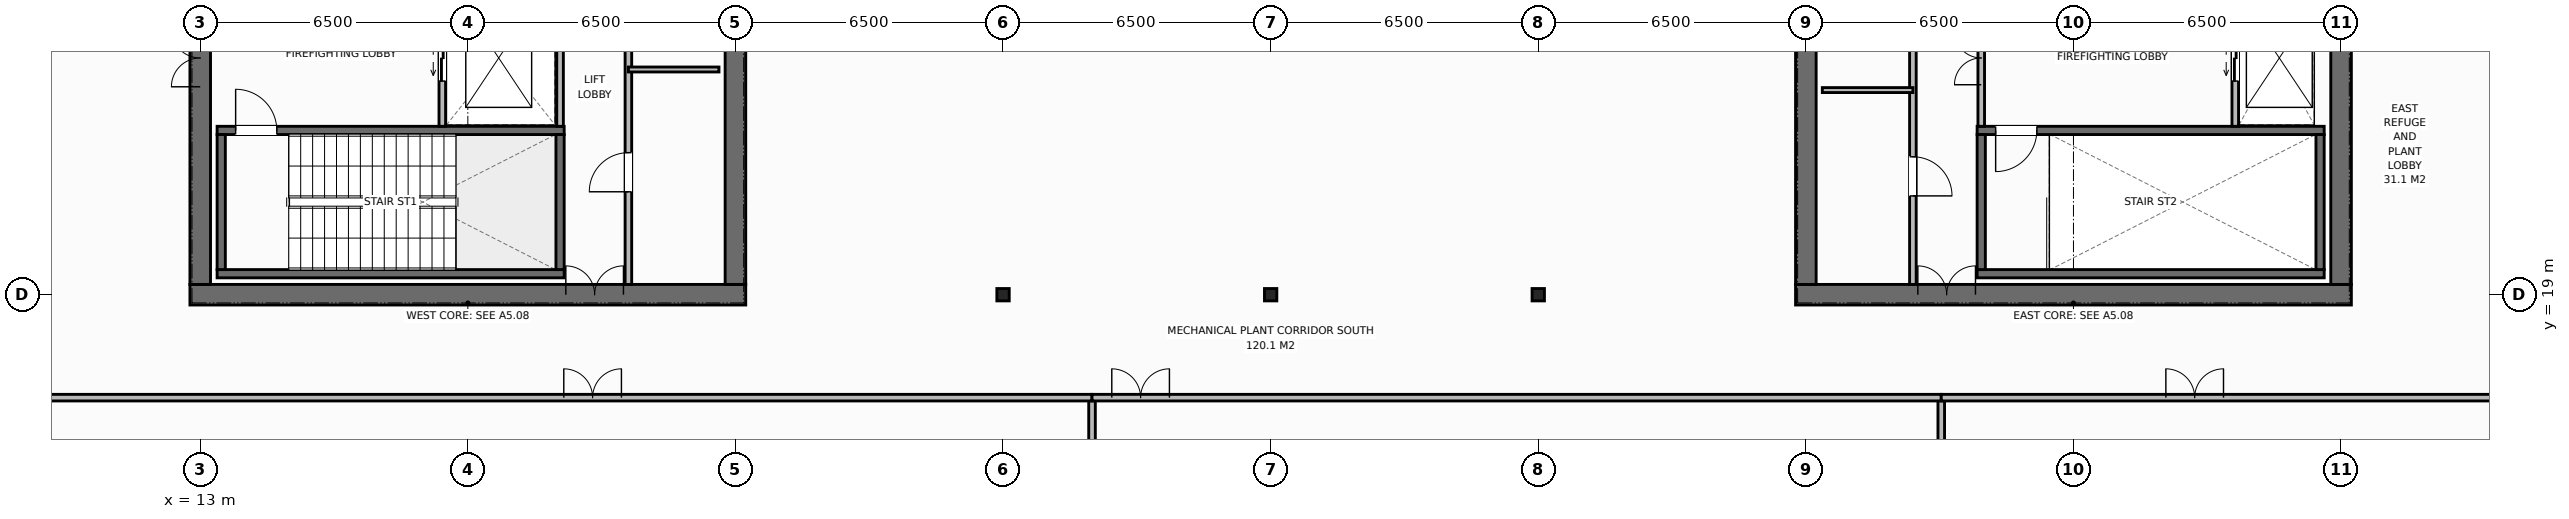
"""IFC4 building model, lengths in metres.
Left out: names, types, materials, properties, quantities, classifications, styles, units other than length and angle.
Written with IfcOpenShell. Run it as: python <this file> out.ifc"""

import sys

from ifc_helpers import new_model, si_unit, direction, frame, frame_2d, origin, origin_2d, place, context, subcontext, project, spatial, rectangle, i_section, extrude, element, fill, save


model = new_model("IFC4")
c1 = context("Model", 3, precision=1e-05, world=origin(), true_north=direction((0.0, 1.0)))
c2 = subcontext(c1, "Body", "Model", "MODEL_VIEW")
j1 = project(units=[si_unit("LENGTHUNIT", "METRE"), si_unit("PLANEANGLEUNIT", "RADIAN")], contexts=[c1])
p1 = place(None, origin())
s1 = spatial("IfcSite", under=j1, at=p1, CompositionType="ELEMENT")
p2 = place(p1, origin())
s2 = spatial("IfcBuilding", under=s1, at=p2, CompositionType="ELEMENT")
p3 = place(p2, frame((0.0, 0.0, 315.4)))
s3 = spatial("IfcBuildingStorey", under=s2, at=p3, CompositionType="ELEMENT", Elevation=315.4)
p4 = place(p3, frame((12.75, 19.0, 0.0), z_axis=(0.0, 0.0, 1.0), x_axis=(1.0, 0.0, 0.0)))
e1 = element("IfcWall", 1, at=p4, inside=s3, PredefinedType="SHEAR", context=c2, shape_type="SweptSolid", body=[
    extrude(rectangle(XDim=13.5, YDim=0.5, at=frame_2d((6.75, 0.0))), origin(), (0.0, 0.0, 1.0), 4.58),
])
p5 = place(p4, frame((9.13, 0.0, 0.0)))
e2 = element("IfcOpeningElement", 2, at=p5, cuts=e1, PredefinedType="OPENING", context=c2, shape_type="SweptSolid", body=[
    extrude(rectangle(XDim=1.4, YDim=2.2, at=frame_2d((0.7, 1.1))), frame((0.0, 0.26, 0.0), z_axis=(0.0, -1.0, 0.0), x_axis=(1.0, 0.0, 0.0)), (0.0, 0.0, 1.0), 0.52),
])
p6 = place(p3, frame((13.0, 19.25, 0.0), z_axis=(0.0, 0.0, 1.0), x_axis=(0.0, 1.0, 0.0)))
e3 = element("IfcWall", 3, at=p6, inside=s3, PredefinedType="SHEAR", context=c2, shape_type="SweptSolid", body=[
    extrude(rectangle(XDim=13.5, YDim=0.5, at=frame_2d((6.75, 0.0))), origin(), (0.0, 0.0, 1.0), 4.58),
])
p7 = place(p6, frame((4.8, 0.0, 0.0)))
e4 = element("IfcOpeningElement", 4, at=p7, cuts=e3, PredefinedType="OPENING", context=c2, shape_type="SweptSolid", body=[
    extrude(rectangle(XDim=1.4, YDim=2.2, at=frame_2d((0.7, 1.1))), frame((0.0, 0.26, 0.0), z_axis=(0.0, -1.0, 0.0), x_axis=(1.0, 0.0, 0.0)), (0.0, 0.0, 1.0), 0.52),
])
p8 = place(p3, frame((26.0, 19.25, 0.0), z_axis=(0.0, 0.0, 1.0), x_axis=(0.0, 1.0, 0.0)))
e5 = element("IfcWall", 5, at=p8, inside=s3, PredefinedType="SHEAR", context=c2, shape_type="SweptSolid", body=[
    extrude(rectangle(XDim=13.5, YDim=0.5, at=frame_2d((6.75, 0.0))), origin(), (0.0, 0.0, 1.0), 4.58),
])
p9 = place(p3, frame((51.75, 19.0, 0.0), z_axis=(0.0, 0.0, 1.0), x_axis=(1.0, 0.0, 0.0)))
e6 = element("IfcWall", 6, at=p9, inside=s3, PredefinedType="SHEAR", context=c2, shape_type="SweptSolid", body=[
    extrude(rectangle(XDim=13.5, YDim=0.5, at=frame_2d((6.75, 0.0))), origin(), (0.0, 0.0, 1.0), 4.58),
])
p10 = place(p9, frame((2.97, 0.0, 0.0)))
e7 = element("IfcOpeningElement", 7, at=p10, cuts=e6, PredefinedType="OPENING", context=c2, shape_type="SweptSolid", body=[
    extrude(rectangle(XDim=1.4, YDim=2.2, at=frame_2d((0.7, 1.1))), frame((0.0, 0.26, 0.0), z_axis=(0.0, -1.0, 0.0), x_axis=(1.0, 0.0, 0.0)), (0.0, 0.0, 1.0), 0.52),
])
p11 = place(p3, frame((52.0, 19.25, 0.0), z_axis=(0.0, 0.0, 1.0), x_axis=(0.0, 1.0, 0.0)))
e8 = element("IfcWall", 8, at=p11, inside=s3, PredefinedType="SHEAR", context=c2, shape_type="SweptSolid", body=[
    extrude(rectangle(XDim=13.5, YDim=0.5, at=frame_2d((6.75, 0.0))), origin(), (0.0, 0.0, 1.0), 4.58),
])
p12 = place(p3, frame((65.0, 19.25, 0.0), z_axis=(0.0, 0.0, 1.0), x_axis=(0.0, 1.0, 0.0)))
e9 = element("IfcWall", 9, at=p12, inside=s3, PredefinedType="SHEAR", context=c2, shape_type="SweptSolid", body=[
    extrude(rectangle(XDim=13.5, YDim=0.5, at=frame_2d((6.75, 0.0))), origin(), (0.0, 0.0, 1.0), 4.58),
])
p13 = place(p12, frame((8.2, 0.0, 0.0)))
e10 = element("IfcOpeningElement", 10, at=p13, cuts=e9, PredefinedType="OPENING", context=c2, shape_type="SweptSolid", body=[
    extrude(rectangle(XDim=1.3, YDim=2.2, at=frame_2d((0.65, 1.1))), frame((0.0, 0.26, 0.0), z_axis=(0.0, -1.0, 0.0), x_axis=(1.0, 0.0, 0.0)), (0.0, 0.0, 1.0), 0.52),
])
p14 = place(p3, frame((13.41, 19.51, 0.0), z_axis=(0.0, 0.0, 1.0), x_axis=(1.0, 0.0, 0.0)))
e11 = element("IfcWall", 11, at=p14, inside=s3, PredefinedType="SHEAR", context=c2, shape_type="SweptSolid", body=[
    extrude(rectangle(XDim=8.43, YDim=0.2, at=frame_2d((4.215, 0.0))), origin(), (0.0, 0.0, 1.0), 4.58),
])
p15 = place(p3, frame((13.41, 22.99, 0.0), z_axis=(0.0, 0.0, 1.0), x_axis=(1.0, 0.0, 0.0)))
e12 = element("IfcWall", 12, at=p15, inside=s3, PredefinedType="SHEAR", context=c2, shape_type="SweptSolid", body=[
    extrude(rectangle(XDim=8.43, YDim=0.2, at=frame_2d((4.215, 0.0))), origin(), (0.0, 0.0, 1.0), 4.58),
])
p16 = place(p15, frame((0.45, 0.0, 0.0)))
e13 = element("IfcOpeningElement", 13, at=p16, cuts=e12, PredefinedType="OPENING", context=c2, shape_type="SweptSolid", body=[
    extrude(rectangle(XDim=1.0, YDim=2.15, at=frame_2d((0.5, 1.075))), frame((0.0, 0.11, 0.0), z_axis=(0.0, -1.0, 0.0), x_axis=(1.0, 0.0, 0.0)), (0.0, 0.0, 1.0), 0.22),
])
for number, where, z_axis, x_axis in (
    (14, (13.51, 19.61, 0.0), (0.0, 0.0, 1.0), (0.0, 1.0, 0.0)),
    (15, (21.74, 19.61, 0.0), (0.0, 0.0, 1.0), (0.0, 1.0, 0.0)),
):
    element("IfcWall", number, at=place(p3, frame(where, z_axis=z_axis, x_axis=x_axis)), inside=s3, PredefinedType="SHEAR", context=c2, shape_type="SweptSolid", body=[
        extrude(rectangle(XDim=3.28, YDim=0.2, at=frame_2d((1.64, 0.0))), origin(), (0.0, 0.0, 1.0), 4.58),
    ])
p17 = place(p3, frame((56.16, 19.51, 0.0), z_axis=(0.0, 0.0, 1.0), x_axis=(1.0, 0.0, 0.0)))
e16 = element("IfcWall", 16, at=p17, inside=s3, PredefinedType="SHEAR", context=c2, shape_type="SweptSolid", body=[
    extrude(rectangle(XDim=8.43, YDim=0.2, at=frame_2d((4.215, 0.0))), origin(), (0.0, 0.0, 1.0), 4.58),
])
p18 = place(p3, frame((56.16, 22.99, 0.0), z_axis=(0.0, 0.0, 1.0), x_axis=(1.0, 0.0, 0.0)))
e17 = element("IfcWall", 17, at=p18, inside=s3, PredefinedType="SHEAR", context=c2, shape_type="SweptSolid", body=[
    extrude(rectangle(XDim=8.43, YDim=0.2, at=frame_2d((4.215, 0.0))), origin(), (0.0, 0.0, 1.0), 4.58),
])
p19 = place(p18, frame((0.45, 0.0, 0.0)))
e18 = element("IfcOpeningElement", 18, at=p19, cuts=e17, PredefinedType="OPENING", context=c2, shape_type="SweptSolid", body=[
    extrude(rectangle(XDim=1.0, YDim=2.15, at=frame_2d((0.5, 1.075))), frame((0.0, 0.11, 0.0), z_axis=(0.0, -1.0, 0.0), x_axis=(1.0, 0.0, 0.0)), (0.0, 0.0, 1.0), 0.22),
])
for number, where, z_axis, x_axis in (
    (19, (56.26, 19.61, 0.0), (0.0, 0.0, 1.0), (0.0, 1.0, 0.0)),
    (20, (64.49, 19.61, 0.0), (0.0, 0.0, 1.0), (0.0, 1.0, 0.0)),
):
    element("IfcWall", number, at=place(p3, frame(where, z_axis=z_axis, x_axis=x_axis)), inside=s3, PredefinedType="SHEAR", context=c2, shape_type="SweptSolid", body=[
        extrude(rectangle(XDim=3.28, YDim=0.2, at=frame_2d((1.64, 0.0))), origin(), (0.0, 0.0, 1.0), 4.58),
    ])
for number, where, z_axis, x_axis in (
    (21, (32.5, 19.0, 0.0), (0.0, 0.0, 1.0), (1.0, 0.0, 0.0)),
    (22, (39.0, 19.0, 0.0), (0.0, 0.0, 1.0), (1.0, 0.0, 0.0)),
    (23, (45.5, 19.0, 0.0), (0.0, 0.0, 1.0), (1.0, 0.0, 0.0)),
):
    element("IfcColumn", number, at=place(p3, frame(where, z_axis=z_axis, x_axis=x_axis)), inside=s3, PredefinedType="COLUMN", context=c2, shape_type="SweptSolid", body=[
        extrude(i_section(OverallWidth=0.3, OverallDepth=0.3, WebThickness=0.011, FlangeThickness=0.019, at=origin_2d()), origin(), (0.0, 0.0, 1.0), 5.0),
    ])
p20 = place(p3, frame((21.74, 23.09, 0.0), z_axis=(0.0, 0.0, 1.0), x_axis=(0.0, 1.0, 0.0)))
e24 = element("IfcWall", 24, at=p20, inside=s3, PredefinedType="STANDARD", context=c2, shape_type="SweptSolid", body=[
    extrude(rectangle(XDim=3.47, YDim=0.16, at=frame_2d((1.735, 0.0))), origin(), (0.0, 0.0, 1.0), 4.58),
])
p21 = place(p3, frame((18.88, 23.09, 0.0), z_axis=(0.0, 0.0, 1.0), x_axis=(0.0, 1.0, 0.0)))
e25 = element("IfcWall", 25, at=p21, inside=s3, PredefinedType="STANDARD", context=c2, shape_type="SweptSolid", body=[
    extrude(rectangle(XDim=3.47, YDim=0.16, at=frame_2d((1.735, 0.0))), origin(), (0.0, 0.0, 1.0), 4.58),
])
p22 = place(p21, frame((1.1, 0.0, 0.0)))
e26 = element("IfcOpeningElement", 26, at=p22, cuts=e25, PredefinedType="OPENING", context=c2, shape_type="SweptSolid", body=[
    extrude(rectangle(XDim=1.1, YDim=2.2, at=frame_2d((0.55, 1.1))), frame((0.0, 0.09, 0.0), z_axis=(0.0, -1.0, 0.0), x_axis=(1.0, 0.0, 0.0)), (0.0, 0.0, 1.0), 0.18),
])
p23 = place(p3, frame((23.4, 19.25, 0.0), z_axis=(0.0, 0.0, 1.0), x_axis=(0.0, 1.0, 0.0)))
e27 = element("IfcWall", 27, at=p23, inside=s3, PredefinedType="STANDARD", context=c2, shape_type="SweptSolid", body=[
    extrude(rectangle(XDim=13.5, YDim=0.16, at=frame_2d((6.75, 0.0))), origin(), (0.0, 0.0, 1.0), 4.58),
])
p24 = place(p23, frame((2.25, 0.0, 0.0)))
e28 = element("IfcOpeningElement", 28, at=p24, cuts=e27, PredefinedType="OPENING", context=c2, shape_type="SweptSolid", body=[
    extrude(rectangle(XDim=0.95, YDim=2.15, at=frame_2d((0.475, 1.075))), frame((0.0, 0.09, 0.0), z_axis=(0.0, -1.0, 0.0), x_axis=(1.0, 0.0, 0.0)), (0.0, 0.0, 1.0), 0.18),
])
p25 = place(p23, frame((6.35, 0.0, 0.0)))
e29 = element("IfcOpeningElement", 29, at=p25, cuts=e27, PredefinedType="OPENING", context=c2, shape_type="SweptSolid", body=[
    extrude(rectangle(XDim=0.95, YDim=2.15, at=frame_2d((0.475, 1.075))), frame((0.0, 0.09, 0.0), z_axis=(0.0, -1.0, 0.0), x_axis=(1.0, 0.0, 0.0)), (0.0, 0.0, 1.0), 0.18),
])
p26 = place(p23, frame((9.95, 0.0, 0.0)))
e30 = element("IfcOpeningElement", 30, at=p26, cuts=e27, PredefinedType="OPENING", context=c2, shape_type="SweptSolid", body=[
    extrude(rectangle(XDim=0.95, YDim=2.15, at=frame_2d((0.475, 1.075))), frame((0.0, 0.09, 0.0), z_axis=(0.0, -1.0, 0.0), x_axis=(1.0, 0.0, 0.0)), (0.0, 0.0, 1.0), 0.18),
])
p27 = place(p3, frame((23.4, 24.47, 0.0), z_axis=(0.0, 0.0, 1.0), x_axis=(1.0, 0.0, 0.0)))
e31 = element("IfcWall", 31, at=p27, inside=s3, PredefinedType="PARTITIONING", context=c2, shape_type="SweptSolid", body=[
    extrude(rectangle(XDim=2.2, YDim=0.12, at=frame_2d((1.1, 0.0))), origin(), (0.0, 0.0, 1.0), 4.58),
])
p28 = place(p3, frame((54.6, 19.25, 0.0), z_axis=(0.0, 0.0, 1.0), x_axis=(0.0, 1.0, 0.0)))
e32 = element("IfcWall", 32, at=p28, inside=s3, PredefinedType="STANDARD", context=c2, shape_type="SweptSolid", body=[
    extrude(rectangle(XDim=13.5, YDim=0.16, at=frame_2d((6.75, 0.0))), origin(), (0.0, 0.0, 1.0), 4.58),
])
p29 = place(p28, frame((2.15, 0.0, 0.0)))
e33 = element("IfcOpeningElement", 33, at=p29, cuts=e32, PredefinedType="OPENING", context=c2, shape_type="SweptSolid", body=[
    extrude(rectangle(XDim=0.95, YDim=2.15, at=frame_2d((0.475, 1.075))), frame((0.0, 0.09, 0.0), z_axis=(0.0, -1.0, 0.0), x_axis=(1.0, 0.0, 0.0)), (0.0, 0.0, 1.0), 0.18),
])
p30 = place(p28, frame((6.25, 0.0, 0.0)))
e34 = element("IfcOpeningElement", 34, at=p30, cuts=e32, PredefinedType="OPENING", context=c2, shape_type="SweptSolid", body=[
    extrude(rectangle(XDim=0.95, YDim=2.15, at=frame_2d((0.475, 1.075))), frame((0.0, 0.09, 0.0), z_axis=(0.0, -1.0, 0.0), x_axis=(1.0, 0.0, 0.0)), (0.0, 0.0, 1.0), 0.18),
])
p31 = place(p28, frame((9.95, 0.0, 0.0)))
e35 = element("IfcOpeningElement", 35, at=p31, cuts=e32, PredefinedType="OPENING", context=c2, shape_type="SweptSolid", body=[
    extrude(rectangle(XDim=0.95, YDim=2.15, at=frame_2d((0.475, 1.075))), frame((0.0, 0.09, 0.0), z_axis=(0.0, -1.0, 0.0), x_axis=(1.0, 0.0, 0.0)), (0.0, 0.0, 1.0), 0.18),
])
p32 = place(p3, frame((56.26, 23.09, 0.0), z_axis=(0.0, 0.0, 1.0), x_axis=(0.0, 1.0, 0.0)))
e36 = element("IfcWall", 36, at=p32, inside=s3, PredefinedType="STANDARD", context=c2, shape_type="SweptSolid", body=[
    extrude(rectangle(XDim=9.66, YDim=0.16, at=frame_2d((4.83, 0.0))), origin(), (0.0, 0.0, 1.0), 4.58),
])
p33 = place(p32, frame((1.01, 0.0, 0.0)))
e37 = element("IfcOpeningElement", 37, at=p33, cuts=e36, PredefinedType="OPENING", context=c2, shape_type="SweptSolid", body=[
    extrude(rectangle(XDim=1.3, YDim=2.2, at=frame_2d((0.65, 1.1))), frame((0.0, 0.09, 0.0), z_axis=(0.0, -1.0, 0.0), x_axis=(1.0, 0.0, 0.0)), (0.0, 0.0, 1.0), 0.18),
])
p34 = place(p3, frame((52.4, 23.97, 0.0), z_axis=(0.0, 0.0, 1.0), x_axis=(1.0, 0.0, 0.0)))
e38 = element("IfcWall", 38, at=p34, inside=s3, PredefinedType="PARTITIONING", context=c2, shape_type="SweptSolid", body=[
    extrude(rectangle(XDim=2.2, YDim=0.12, at=frame_2d((1.1, 0.0))), origin(), (0.0, 0.0, 1.0), 4.58),
])
p35 = place(p3, frame((62.43, 23.09, 0.0), z_axis=(0.0, 0.0, 1.0), x_axis=(0.0, 1.0, 0.0)))
e39 = element("IfcWall", 39, at=p35, inside=s3, PredefinedType="STANDARD", context=c2, shape_type="SweptSolid", body=[
    extrude(rectangle(XDim=3.47, YDim=0.16, at=frame_2d((1.735, 0.0))), origin(), (0.0, 0.0, 1.0), 4.58),
])
p36 = place(p35, frame((1.1, 0.0, 0.0)))
e40 = element("IfcOpeningElement", 40, at=p36, cuts=e39, PredefinedType="OPENING", context=c2, shape_type="SweptSolid", body=[
    extrude(rectangle(XDim=1.1, YDim=2.2, at=frame_2d((0.55, 1.1))), frame((0.0, 0.09, 0.0), z_axis=(0.0, -1.0, 0.0), x_axis=(1.0, 0.0, 0.0)), (0.0, 0.0, 1.0), 0.18),
])
p37 = place(p3, frame((34.661, 5.12, 0.0), z_axis=(0.0, 0.0, 1.0), x_axis=(0.0, 1.0, 0.0)))
e41 = element("IfcWall", 41, at=p37, inside=s3, PredefinedType="STANDARD", context=c2, shape_type="SweptSolid", body=[
    extrude(rectangle(XDim=11.38, YDim=0.16, at=frame_2d((5.69, 0.0))), origin(), (0.0, 0.0, 1.0), 4.58),
])
p38 = place(p3, frame((7.22, 16.5, 0.0), z_axis=(0.0, 0.0, 1.0), x_axis=(1.0, 0.0, 0.0)))
e42 = element("IfcWall", 42, at=p38, inside=s3, PredefinedType="STANDARD", context=c2, shape_type="SweptSolid", body=[
    extrude(rectangle(XDim=27.441, YDim=0.16, at=frame_2d((13.721, 0.0))), origin(), (0.0, 0.0, 1.0), 4.58),
])
p39 = place(p38, frame((14.611, 0.0, 0.0)))
e43 = element("IfcOpeningElement", 43, at=p39, cuts=e42, PredefinedType="OPENING", context=c2, shape_type="SweptSolid", body=[
    extrude(rectangle(XDim=1.4, YDim=2.2, at=frame_2d((0.7, 1.1))), frame((0.0, 0.09, 0.0), z_axis=(0.0, -1.0, 0.0), x_axis=(1.0, 0.0, 0.0)), (0.0, 0.0, 1.0), 0.18),
])
p40 = place(p3, frame((55.289, 5.12, 0.0), z_axis=(0.0, 0.0, 1.0), x_axis=(0.0, 1.0, 0.0)))
e44 = element("IfcWall", 44, at=p40, inside=s3, PredefinedType="STANDARD", context=c2, shape_type="SweptSolid", body=[
    extrude(rectangle(XDim=11.38, YDim=0.16, at=frame_2d((5.69, 0.0))), origin(), (0.0, 0.0, 1.0), 4.58),
])
p41 = place(p3, frame((34.661, 16.5, 0.0), z_axis=(0.0, 0.0, 1.0), x_axis=(1.0, 0.0, 0.0)))
e45 = element("IfcWall", 45, at=p41, inside=s3, PredefinedType="STANDARD", context=c2, shape_type="SweptSolid", body=[
    extrude(rectangle(XDim=20.627, YDim=0.16, at=frame_2d((10.314, 0.0))), origin(), (0.0, 0.0, 1.0), 4.58),
])
p42 = place(p41, frame((0.48, 0.0, 0.0)))
e46 = element("IfcOpeningElement", 46, at=p42, cuts=e45, PredefinedType="OPENING", context=c2, shape_type="SweptSolid", body=[
    extrude(rectangle(XDim=1.4, YDim=2.2, at=frame_2d((0.7, 1.1))), frame((0.0, 0.09, 0.0), z_axis=(0.0, -1.0, 0.0), x_axis=(1.0, 0.0, 0.0)), (0.0, 0.0, 1.0), 0.18),
])
p43 = place(p3, frame((55.289, 16.5, 0.0), z_axis=(0.0, 0.0, 1.0), x_axis=(1.0, 0.0, 0.0)))
e47 = element("IfcWall", 47, at=p43, inside=s3, PredefinedType="STANDARD", context=c2, shape_type="SweptSolid", body=[
    extrude(rectangle(XDim=18.791, YDim=0.16, at=frame_2d((9.396, 0.0))), origin(), (0.0, 0.0, 1.0), 4.58),
])
p44 = place(p43, frame((5.456, 0.0, 0.0)))
e48 = element("IfcOpeningElement", 48, at=p44, cuts=e47, PredefinedType="OPENING", context=c2, shape_type="SweptSolid", body=[
    extrude(rectangle(XDim=1.4, YDim=2.2, at=frame_2d((0.7, 1.1))), frame((0.0, 0.09, 0.0), z_axis=(0.0, -1.0, 0.0), x_axis=(1.0, 0.0, 0.0)), (0.0, 0.0, 1.0), 0.18),
])
p45 = place(p16, origin())
e49 = element("IfcDoor", 49, at=p45, inside=s3, OperationType="SINGLE_SWING_LEFT", PredefinedType="DOOR", context=c2, shape_type="SweptSolid", body=[
    extrude(rectangle(XDim=1.0, YDim=2.15, at=frame_2d((0.5, 1.075))), frame((0.0, 0.025, 0.0), z_axis=(0.0, -1.0, 0.0), x_axis=(1.0, 0.0, 0.0)), (0.0, 0.0, 1.0), 0.05),
])
fill(e13, e49)
p46 = place(p7, origin())
e50 = element("IfcDoor", 50, at=p46, inside=s3, OperationType="DOUBLE_DOOR_SINGLE_SWING", PredefinedType="DOOR", context=c2, shape_type="SweptSolid", body=[
    extrude(rectangle(XDim=1.4, YDim=2.2, at=frame_2d((0.7, 1.1))), frame((0.0, 0.025, 0.0), z_axis=(0.0, -1.0, 0.0), x_axis=(1.0, 0.0, 0.0)), (0.0, 0.0, 1.0), 0.05),
])
fill(e4, e50)
p47 = place(p22, origin())
e51 = element("IfcDoor", 51, at=p47, inside=s3, OperationType="DOUBLE_DOOR_SLIDING", PredefinedType="DOOR", context=c2, shape_type="SweptSolid", body=[
    extrude(rectangle(XDim=1.1, YDim=2.2, at=frame_2d((0.55, 1.1))), frame((0.0, 0.025, 0.0), z_axis=(0.0, -1.0, 0.0), x_axis=(1.0, 0.0, 0.0)), (0.0, 0.0, 1.0), 0.05),
])
fill(e26, e51)
p48 = place(p5, origin())
e52 = element("IfcDoor", 52, at=p48, inside=s3, OperationType="DOUBLE_DOOR_SINGLE_SWING", PredefinedType="DOOR", context=c2, shape_type="SweptSolid", body=[
    extrude(rectangle(XDim=1.4, YDim=2.2, at=frame_2d((0.7, 1.1))), frame((0.0, 0.075, 0.0), z_axis=(0.0, -1.0, 0.0), x_axis=(1.0, 0.0, 0.0)), (0.0, 0.0, 1.0), 0.05),
])
fill(e2, e52)
p49 = place(p24, origin())
e53 = element("IfcDoor", 53, at=p49, inside=s3, OperationType="SINGLE_SWING_LEFT", PredefinedType="DOOR", context=c2, shape_type="SweptSolid", body=[
    extrude(rectangle(XDim=0.95, YDim=2.15, at=frame_2d((0.475, 1.075))), frame((0.0, 0.025, 0.0), z_axis=(0.0, -1.0, 0.0), x_axis=(1.0, 0.0, 0.0)), (0.0, 0.0, 1.0), 0.05),
])
fill(e28, e53)
p50 = place(p10, origin())
e54 = element("IfcDoor", 54, at=p50, inside=s3, OperationType="DOUBLE_DOOR_SINGLE_SWING", PredefinedType="DOOR", context=c2, shape_type="SweptSolid", body=[
    extrude(rectangle(XDim=1.4, YDim=2.2, at=frame_2d((0.7, 1.1))), frame((0.0, 0.075, 0.0), z_axis=(0.0, -1.0, 0.0), x_axis=(1.0, 0.0, 0.0)), (0.0, 0.0, 1.0), 0.05),
])
fill(e7, e54)
p51 = place(p29, origin())
e55 = element("IfcDoor", 55, at=p51, inside=s3, OperationType="SINGLE_SWING_RIGHT", PredefinedType="DOOR", context=c2, shape_type="SweptSolid", body=[
    extrude(rectangle(XDim=0.95, YDim=2.15, at=frame_2d((0.475, 1.075))), frame((0.0, 0.025, 0.0), z_axis=(0.0, -1.0, 0.0), x_axis=(1.0, 0.0, 0.0)), (0.0, 0.0, 1.0), 0.05),
])
fill(e33, e55)
p52 = place(p19, origin())
e56 = element("IfcDoor", 56, at=p52, inside=s3, OperationType="SINGLE_SWING_RIGHT", PredefinedType="DOOR", context=c2, shape_type="SweptSolid", body=[
    extrude(rectangle(XDim=1.0, YDim=2.15, at=frame_2d((0.5, 1.075))), frame((0.0, 0.025, 0.0), z_axis=(0.0, -1.0, 0.0), x_axis=(1.0, 0.0, 0.0)), (0.0, 0.0, 1.0), 0.05),
])
fill(e18, e56)
p53 = place(p36, origin())
e57 = element("IfcDoor", 57, at=p53, inside=s3, OperationType="DOUBLE_DOOR_SLIDING", PredefinedType="DOOR", context=c2, shape_type="SweptSolid", body=[
    extrude(rectangle(XDim=1.1, YDim=2.2, at=frame_2d((0.55, 1.1))), frame((0.0, 0.025, 0.0), z_axis=(0.0, -1.0, 0.0), x_axis=(1.0, 0.0, 0.0)), (0.0, 0.0, 1.0), 0.05),
])
fill(e40, e57)
p54 = place(p33, origin())
e58 = element("IfcDoor", 58, at=p54, inside=s3, OperationType="DOUBLE_DOOR_SINGLE_SWING", PredefinedType="DOOR", context=c2, shape_type="SweptSolid", body=[
    extrude(rectangle(XDim=1.3, YDim=2.2, at=frame_2d((0.65, 1.1))), frame((0.0, 0.025, 0.0), z_axis=(0.0, -1.0, 0.0), x_axis=(1.0, 0.0, 0.0)), (0.0, 0.0, 1.0), 0.05),
])
fill(e37, e58)
p55 = place(p39, origin())
e59 = element("IfcDoor", 59, at=p55, inside=s3, OperationType="DOUBLE_DOOR_SINGLE_SWING", PredefinedType="DOOR", context=c2, shape_type="SweptSolid", body=[
    extrude(rectangle(XDim=1.4, YDim=2.2, at=frame_2d((0.7, 1.1))), frame((0.0, 0.025, 0.0), z_axis=(0.0, -1.0, 0.0), x_axis=(1.0, 0.0, 0.0)), (0.0, 0.0, 1.0), 0.05),
])
fill(e43, e59)
p56 = place(p42, origin())
e60 = element("IfcDoor", 60, at=p56, inside=s3, OperationType="DOUBLE_DOOR_SINGLE_SWING", PredefinedType="DOOR", context=c2, shape_type="SweptSolid", body=[
    extrude(rectangle(XDim=1.4, YDim=2.2, at=frame_2d((0.7, 1.1))), frame((0.0, 0.025, 0.0), z_axis=(0.0, -1.0, 0.0), x_axis=(1.0, 0.0, 0.0)), (0.0, 0.0, 1.0), 0.05),
])
fill(e46, e60)
p57 = place(p44, origin())
e61 = element("IfcDoor", 61, at=p57, inside=s3, OperationType="DOUBLE_DOOR_SINGLE_SWING", PredefinedType="DOOR", context=c2, shape_type="SweptSolid", body=[
    extrude(rectangle(XDim=1.4, YDim=2.2, at=frame_2d((0.7, 1.1))), frame((0.0, 0.025, 0.0), z_axis=(0.0, -1.0, 0.0), x_axis=(1.0, 0.0, 0.0)), (0.0, 0.0, 1.0), 0.05),
])
fill(e48, e61)
save(model, sys.argv[1])
